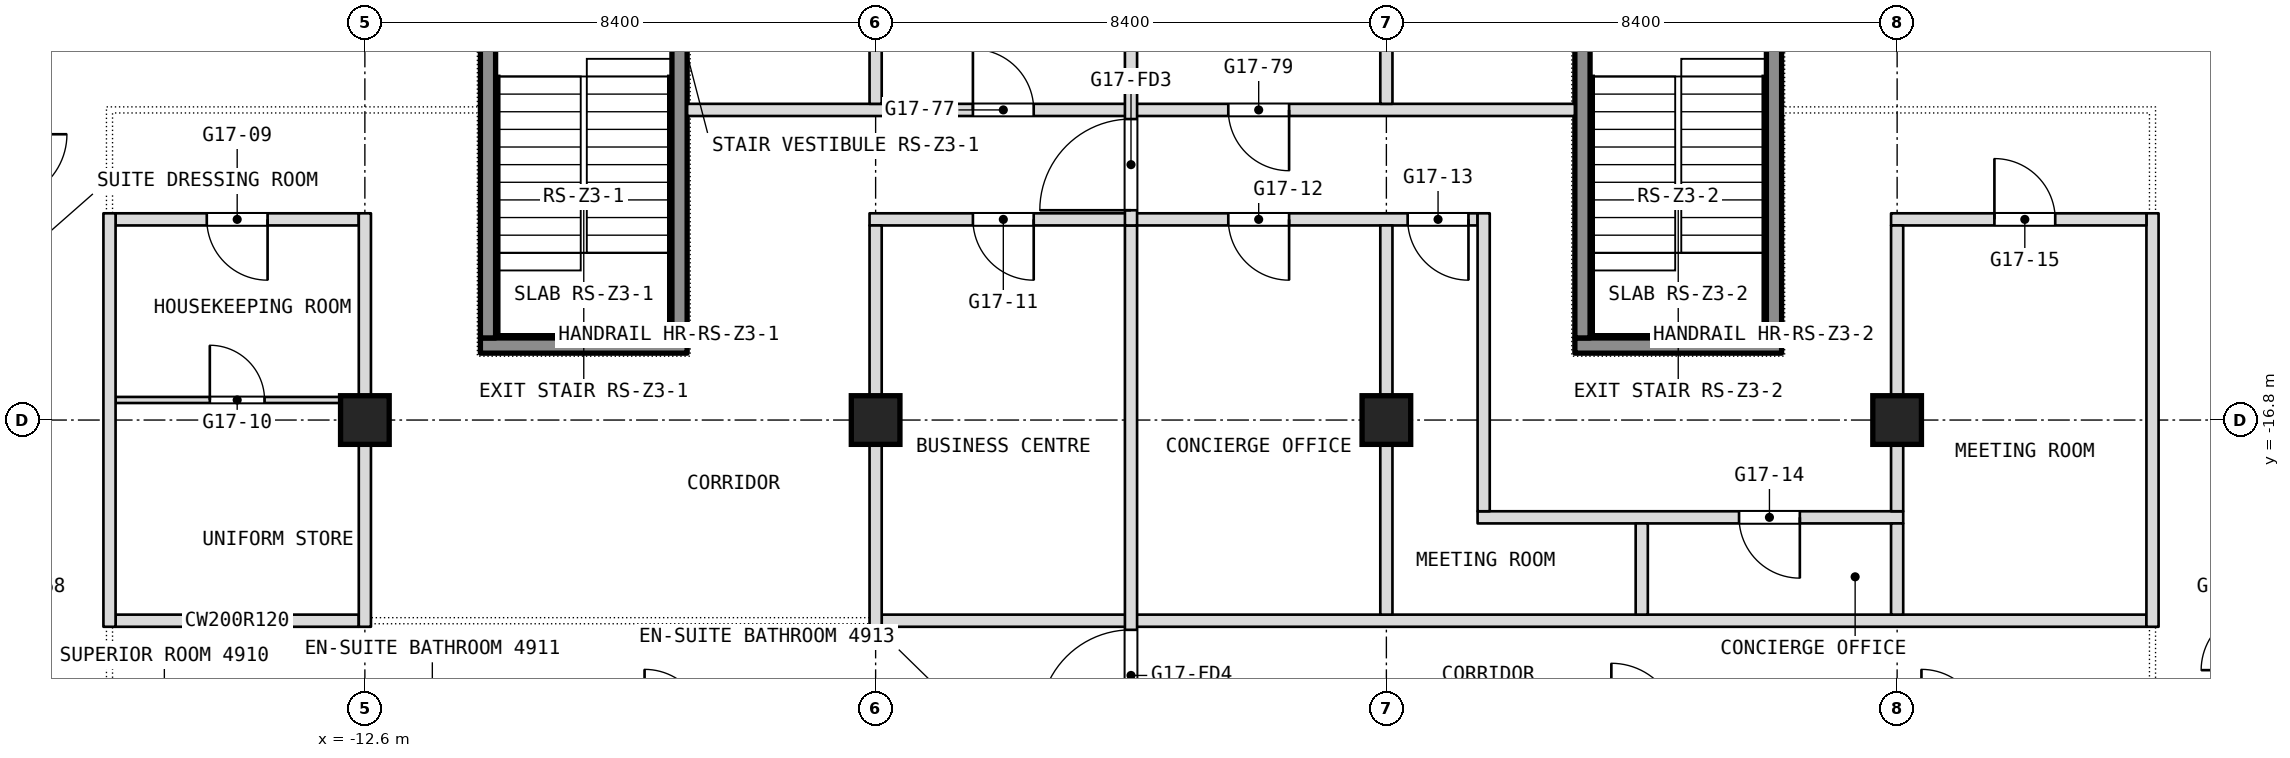
"""IFC4 building model, lengths in metres.
Left out: names, types, materials, properties, quantities, classifications, styles, units other than length and angle.
Written with IfcOpenShell. Run it as: python <this file> out.ifc"""

import sys

from ifc_helpers import new_model, si_unit, direction, frame, frame_2d, origin, origin_2d, place, context, subcontext, project, spatial, rectangle, extrude, element, fill, save


model = new_model("IFC4")
c1 = context("Model", 3, precision=1e-05, world=origin(), true_north=direction((0.0, 1.0)))
c2 = subcontext(c1, "Body", "Model", "MODEL_VIEW")
j1 = project(units=[si_unit("LENGTHUNIT", "METRE"), si_unit("PLANEANGLEUNIT", "RADIAN")], contexts=[c1])
p1 = place(None, origin())
s1 = spatial("IfcSite", under=j1, at=p1, CompositionType="ELEMENT")
p2 = place(p1, origin())
s2 = spatial("IfcBuilding", under=s1, at=p2, CompositionType="ELEMENT")
p3 = place(p2, frame((0.0, 0.0, 212.9)))
s3 = spatial("IfcBuildingStorey", under=s2, at=p3, CompositionType="ELEMENT", Elevation=212.9)
for number, where, z_axis, x_axis in (
    (1, (-12.6, -16.8, 0.0), (0.0, 0.0, 1.0), (1.0, 0.0, 0.0)),
    (2, (-4.2, -16.8, 0.0), (0.0, 0.0, 1.0), (1.0, 0.0, 0.0)),
    (3, (4.2, -16.8, 0.0), (0.0, 0.0, 1.0), (1.0, 0.0, 0.0)),
    (4, (12.6, -16.8, 0.0), (0.0, 0.0, 1.0), (1.0, 0.0, 0.0)),
):
    element("IfcColumn", number, at=place(p3, frame(where, z_axis=z_axis, x_axis=x_axis)), inside=s3, PredefinedType="COLUMN", context=c2, shape_type="SweptSolid", body=[
        extrude(rectangle(XDim=0.8, YDim=0.8, at=origin_2d()), origin(), (0.0, 0.0, 1.0), 3.6),
    ])
p4 = place(p3, frame((-16.7, -20.1, 0.0), z_axis=(0.0, 0.0, 1.0), x_axis=(1.0, 0.0, 0.0)))
e5 = element("IfcWall", 5, at=p4, inside=s3, PredefinedType="PARTITIONING", context=c2, shape_type="SweptSolid", body=[
    extrude(rectangle(XDim=4.0, YDim=0.2, at=frame_2d((2.0, 0.0))), origin(), (0.0, 0.0, 1.0), 3.34),
])
p5 = place(p3, frame((-4.1, -20.1, 0.0), z_axis=(0.0, 0.0, 1.0), x_axis=(1.0, 0.0, 0.0)))
e6 = element("IfcWall", 6, at=p5, inside=s3, PredefinedType="PARTITIONING", context=c2, shape_type="SweptSolid", body=[
    extrude(rectangle(XDim=20.8, YDim=0.2, at=frame_2d((10.4, 0.0))), origin(), (0.0, 0.0, 1.0), 3.34),
])
p6 = place(p3, frame((5.7, -18.4, 0.0), z_axis=(0.0, 0.0, 1.0), x_axis=(1.0, 0.0, 0.0)))
e7 = element("IfcWall", 7, at=p6, inside=s3, PredefinedType="PARTITIONING", context=c2, shape_type="SweptSolid", body=[
    extrude(rectangle(XDim=7.0, YDim=0.2, at=frame_2d((3.5, 0.0))), origin(), (0.0, 0.0, 1.0), 3.34),
])
p7 = place(p6, frame((4.3, 0.0, 0.0)))
e8 = element("IfcOpeningElement", 8, at=p7, cuts=e7, PredefinedType="OPENING", context=c2, shape_type="SweptSolid", body=[
    extrude(rectangle(XDim=1.0, YDim=2.1, at=frame_2d((0.5, 1.05))), frame((0.0, 0.1, 0.0), z_axis=(0.0, -1.0, 0.0), x_axis=(1.0, 0.0, 0.0)), (0.0, 0.0, 1.0), 0.2),
])
p8 = place(p3, frame((16.8, -20.2, 0.0), z_axis=(0.0, 0.0, 1.0), x_axis=(0.0, 1.0, 0.0)))
e9 = element("IfcWall", 9, at=p8, inside=s3, PredefinedType="PARTITIONING", context=c2, shape_type="SweptSolid", body=[
    extrude(rectangle(XDim=6.8, YDim=0.2, at=frame_2d((3.4, 0.0))), origin(), (0.0, 0.0, 1.0), 3.34),
])
p9 = place(p3, frame((-16.7, -16.47, 0.0), z_axis=(0.0, 0.0, 1.0), x_axis=(1.0, 0.0, 0.0)))
e10 = element("IfcWall", 10, at=p9, inside=s3, PredefinedType="PARTITIONING", context=c2, shape_type="SweptSolid", body=[
    extrude(rectangle(XDim=4.0, YDim=0.1, at=frame_2d((2.0, 0.0))), origin(), (0.0, 0.0, 1.0), 3.34),
])
p10 = place(p9, frame((1.55, 0.0, 0.0)))
e11 = element("IfcOpeningElement", 11, at=p10, cuts=e10, PredefinedType="OPENING", context=c2, shape_type="SweptSolid", body=[
    extrude(rectangle(XDim=0.9, YDim=2.1, at=frame_2d((0.45, 1.05))), frame((0.0, 0.05, 0.0), z_axis=(0.0, -1.0, 0.0), x_axis=(1.0, 0.0, 0.0)), (0.0, 0.0, 1.0), 0.1),
])
p11 = place(p3, frame((-16.7, -13.5, 0.0), z_axis=(0.0, 0.0, 1.0), x_axis=(1.0, 0.0, 0.0)))
e12 = element("IfcWall", 12, at=p11, inside=s3, PredefinedType="PARTITIONING", context=c2, shape_type="SweptSolid", body=[
    extrude(rectangle(XDim=4.0, YDim=0.2, at=frame_2d((2.0, 0.0))), origin(), (0.0, 0.0, 1.0), 3.34),
])
p12 = place(p11, frame((1.5, 0.0, 0.0)))
e13 = element("IfcOpeningElement", 13, at=p12, cuts=e12, PredefinedType="OPENING", context=c2, shape_type="SweptSolid", body=[
    extrude(rectangle(XDim=1.0, YDim=2.1, at=frame_2d((0.5, 1.05))), frame((0.0, 0.1, 0.0), z_axis=(0.0, -1.0, 0.0), x_axis=(1.0, 0.0, 0.0)), (0.0, 0.0, 1.0), 0.2),
])
p13 = place(p3, frame((-4.3, -13.5, 0.0), z_axis=(0.0, 0.0, 1.0), x_axis=(1.0, 0.0, 0.0)))
e14 = element("IfcWall", 14, at=p13, inside=s3, PredefinedType="PARTITIONING", context=c2, shape_type="SweptSolid", body=[
    extrude(rectangle(XDim=10.0, YDim=0.2, at=frame_2d((5.0, 0.0))), origin(), (0.0, 0.0, 1.0), 3.34),
])
p14 = place(p13, frame((1.7, 0.0, 0.0)))
e15 = element("IfcOpeningElement", 15, at=p14, cuts=e14, PredefinedType="OPENING", context=c2, shape_type="SweptSolid", body=[
    extrude(rectangle(XDim=1.0, YDim=2.1, at=frame_2d((0.5, 1.05))), frame((0.0, 0.1, 0.0), z_axis=(0.0, -1.0, 0.0), x_axis=(1.0, 0.0, 0.0)), (0.0, 0.0, 1.0), 0.2),
])
p15 = place(p13, frame((5.9, 0.0, 0.0)))
e16 = element("IfcOpeningElement", 16, at=p15, cuts=e14, PredefinedType="OPENING", context=c2, shape_type="SweptSolid", body=[
    extrude(rectangle(XDim=1.0, YDim=2.1, at=frame_2d((0.5, 1.05))), frame((0.0, 0.1, 0.0), z_axis=(0.0, -1.0, 0.0), x_axis=(1.0, 0.0, 0.0)), (0.0, 0.0, 1.0), 0.2),
])
p16 = place(p13, frame((8.85, 0.0, 0.0)))
e17 = element("IfcOpeningElement", 17, at=p16, cuts=e14, PredefinedType="OPENING", context=c2, shape_type="SweptSolid", body=[
    extrude(rectangle(XDim=1.0, YDim=2.1, at=frame_2d((0.5, 1.05))), frame((0.0, 0.1, 0.0), z_axis=(0.0, -1.0, 0.0), x_axis=(1.0, 0.0, 0.0)), (0.0, 0.0, 1.0), 0.2),
])
p17 = place(p3, frame((12.5, -13.5, 0.0), z_axis=(0.0, 0.0, 1.0), x_axis=(1.0, 0.0, 0.0)))
e18 = element("IfcWall", 18, at=p17, inside=s3, PredefinedType="PARTITIONING", context=c2, shape_type="SweptSolid", body=[
    extrude(rectangle(XDim=4.2, YDim=0.2, at=frame_2d((2.1, 0.0))), origin(), (0.0, 0.0, 1.0), 3.34),
])
p18 = place(p17, frame((1.7, 0.0, 0.0)))
e19 = element("IfcOpeningElement", 19, at=p18, cuts=e18, PredefinedType="OPENING", context=c2, shape_type="SweptSolid", body=[
    extrude(rectangle(XDim=1.0, YDim=2.1, at=frame_2d((0.5, 1.05))), frame((0.0, 0.1, 0.0), z_axis=(0.0, -1.0, 0.0), x_axis=(1.0, 0.0, 0.0)), (0.0, 0.0, 1.0), 0.2),
])
p19 = place(p3, frame((12.6, -20.0, 0.0), z_axis=(0.0, 0.0, 1.0), x_axis=(0.0, 1.0, 0.0)))
e20 = element("IfcWall", 20, at=p19, inside=s3, PredefinedType="PARTITIONING", context=c2, shape_type="SweptSolid", body=[
    extrude(rectangle(XDim=1.5, YDim=0.2, at=frame_2d((0.75, 0.0))), origin(), (0.0, 0.0, 1.0), 3.34),
])
p20 = place(p3, frame((12.6, -18.3, 0.0), z_axis=(0.0, 0.0, 1.0), x_axis=(0.0, 1.0, 0.0)))
e21 = element("IfcWall", 21, at=p20, inside=s3, PredefinedType="PARTITIONING", context=c2, shape_type="SweptSolid", body=[
    extrude(rectangle(XDim=4.7, YDim=0.2, at=frame_2d((2.35, 0.0))), origin(), (0.0, 0.0, 1.0), 3.34),
])
p21 = place(p3, frame((-7.3, -11.7, 0.0), z_axis=(0.0, 0.0, 1.0), x_axis=(1.0, 0.0, 0.0)))
e22 = element("IfcWall", 22, at=p21, inside=s3, PredefinedType="PARTITIONING", context=c2, shape_type="SweptSolid", body=[
    extrude(rectangle(XDim=14.6, YDim=0.2, at=frame_2d((7.3, 0.0))), origin(), (0.0, 0.0, 1.0), 3.34),
])
p22 = place(p21, frame((4.7, 0.0, 0.0)))
e23 = element("IfcOpeningElement", 23, at=p22, cuts=e22, PredefinedType="OPENING", context=c2, shape_type="SweptSolid", body=[
    extrude(rectangle(XDim=1.0, YDim=2.1, at=frame_2d((0.5, 1.05))), frame((0.0, 0.1, 0.0), z_axis=(0.0, -1.0, 0.0), x_axis=(1.0, 0.0, 0.0)), (0.0, 0.0, 1.0), 0.2),
])
p23 = place(p21, frame((8.9, 0.0, 0.0)))
e24 = element("IfcOpeningElement", 24, at=p23, cuts=e22, PredefinedType="OPENING", context=c2, shape_type="SweptSolid", body=[
    extrude(rectangle(XDim=1.0, YDim=2.1, at=frame_2d((0.5, 1.05))), frame((0.0, 0.1, 0.0), z_axis=(0.0, -1.0, 0.0), x_axis=(1.0, 0.0, 0.0)), (0.0, 0.0, 1.0), 0.2),
])
p24 = place(p3, frame((8.4, -20.0, 0.0), z_axis=(0.0, 0.0, 1.0), x_axis=(0.0, 1.0, 0.0)))
e25 = element("IfcWall", 25, at=p24, inside=s3, PredefinedType="PARTITIONING", context=c2, shape_type="SweptSolid", body=[
    extrude(rectangle(XDim=1.5, YDim=0.2, at=frame_2d((0.75, 0.0))), origin(), (0.0, 0.0, 1.0), 3.34),
])
p25 = place(p3, frame((5.8, -18.3, 0.0), z_axis=(0.0, 0.0, 1.0), x_axis=(0.0, 1.0, 0.0)))
e26 = element("IfcWall", 26, at=p25, inside=s3, PredefinedType="PARTITIONING", context=c2, shape_type="SweptSolid", body=[
    extrude(rectangle(XDim=4.9, YDim=0.2, at=frame_2d((2.45, 0.0))), origin(), (0.0, 0.0, 1.0), 3.34),
])
p26 = place(p3, frame((4.2, -20.0, 0.0), z_axis=(0.0, 0.0, 1.0), x_axis=(0.0, 1.0, 0.0)))
e27 = element("IfcWall", 27, at=p26, inside=s3, PredefinedType="PARTITIONING", context=c2, shape_type="SweptSolid", body=[
    extrude(rectangle(XDim=6.4, YDim=0.2, at=frame_2d((3.2, 0.0))), origin(), (0.0, 0.0, 1.0), 3.34),
])
p27 = place(p3, frame((4.2, -11.6, 0.0), z_axis=(0.0, 0.0, 1.0), x_axis=(0.0, 1.0, 0.0)))
e28 = element("IfcWall", 28, at=p27, inside=s3, PredefinedType="PARTITIONING", context=c2, shape_type="SweptSolid", body=[
    extrude(rectangle(XDim=9.7, YDim=0.2, at=frame_2d((4.85, 0.0))), origin(), (0.0, 0.0, 1.0), 3.34),
])
p28 = place(p3, frame((0.0, -22.0, 0.0), z_axis=(0.0, 0.0, 1.0), x_axis=(0.0, 1.0, 0.0)))
e29 = element("IfcWall", 29, at=p28, inside=s3, PredefinedType="PARTITIONING", context=c2, shape_type="SweptSolid", body=[
    extrude(rectangle(XDim=8.4, YDim=0.2, at=frame_2d((4.2, 0.0))), origin(), (0.0, 0.0, 1.0), 3.34),
])
p29 = place(p28, frame((0.25, 0.0, 0.0)))
e30 = element("IfcOpeningElement", 30, at=p29, cuts=e29, PredefinedType="OPENING", context=c2, shape_type="SweptSolid", body=[
    extrude(rectangle(XDim=1.5, YDim=2.1, at=frame_2d((0.75, 1.05))), frame((0.0, 0.1, 0.0), z_axis=(0.0, -1.0, 0.0), x_axis=(1.0, 0.0, 0.0)), (0.0, 0.0, 1.0), 0.2),
])
p30 = place(p3, frame((0.0, -13.6, 0.0), z_axis=(0.0, 0.0, 1.0), x_axis=(0.0, 1.0, 0.0)))
e31 = element("IfcWall", 31, at=p30, inside=s3, PredefinedType="PARTITIONING", context=c2, shape_type="SweptSolid", body=[
    extrude(rectangle(XDim=13.6, YDim=0.2, at=frame_2d((6.8, 0.0))), origin(), (0.0, 0.0, 1.0), 3.34),
])
p31 = place(p30, frame((11.95, 0.0, 0.0)))
e32 = element("IfcOpeningElement", 32, at=p31, cuts=e31, PredefinedType="OPENING", context=c2, shape_type="SweptSolid", body=[
    extrude(rectangle(XDim=1.5, YDim=2.1, at=frame_2d((0.75, 1.05))), frame((0.0, 0.1, 0.0), z_axis=(0.0, -1.0, 0.0), x_axis=(1.0, 0.0, 0.0)), (0.0, 0.0, 1.0), 0.2),
])
p32 = place(p30, frame((0.25, 0.0, 0.0)))
e33 = element("IfcOpeningElement", 33, at=p32, cuts=e31, PredefinedType="OPENING", context=c2, shape_type="SweptSolid", body=[
    extrude(rectangle(XDim=1.5, YDim=2.1, at=frame_2d((0.75, 1.05))), frame((0.0, 0.1, 0.0), z_axis=(0.0, -1.0, 0.0), x_axis=(1.0, 0.0, 0.0)), (0.0, 0.0, 1.0), 0.2),
])
p33 = place(p3, frame((-4.2, -11.6, 0.0), z_axis=(0.0, 0.0, 1.0), x_axis=(0.0, 1.0, 0.0)))
e34 = element("IfcWall", 34, at=p33, inside=s3, PredefinedType="PARTITIONING", context=c2, shape_type="SweptSolid", body=[
    extrude(rectangle(XDim=9.7, YDim=0.2, at=frame_2d((4.85, 0.0))), origin(), (0.0, 0.0, 1.0), 3.34),
])
p34 = place(p3, frame((-4.2, -20.2, 0.0), z_axis=(0.0, 0.0, 1.0), x_axis=(0.0, 1.0, 0.0)))
e35 = element("IfcWall", 35, at=p34, inside=s3, PredefinedType="PARTITIONING", context=c2, shape_type="SweptSolid", body=[
    extrude(rectangle(XDim=6.6, YDim=0.2, at=frame_2d((3.3, 0.0))), origin(), (0.0, 0.0, 1.0), 3.34),
])
for number, where, z_axis, x_axis in (
    (36, (-12.6, -20.2, 0.0), (0.0, 0.0, 1.0), (0.0, 1.0, 0.0)),
    (37, (-16.8, -20.2, 0.0), (0.0, 0.0, 1.0), (0.0, 1.0, 0.0)),
):
    element("IfcWall", number, at=place(p3, frame(where, z_axis=z_axis, x_axis=x_axis)), inside=s3, PredefinedType="PARTITIONING", context=c2, shape_type="SweptSolid", body=[
        extrude(rectangle(XDim=6.8, YDim=0.2, at=frame_2d((3.4, 0.0))), origin(), (0.0, 0.0, 1.0), 3.34),
    ])
p35 = place(p3, frame((-10.7, -15.575, 0.1), z_axis=(0.0, 0.0, 1.0), x_axis=(1.0, 0.0, 0.0)))
e38 = element("IfcWall", 38, at=p35, inside=s3, PredefinedType="SHEAR", context=c2, shape_type="SweptSolid", body=[
    extrude(rectangle(XDim=3.4, YDim=0.25, at=frame_2d((1.7, 0.0))), origin(), (0.0, 0.0, 1.0), 3.6),
])
for number, where, z_axis, x_axis in (
    (39, (-10.575, -15.45, 0.1), (0.0, 0.0, 1.0), (0.0, 1.0, 0.0)),
    (40, (-7.425, -15.45, 0.1), (0.0, 0.0, 1.0), (0.0, 1.0, 0.0)),
):
    element("IfcWall", number, at=place(p3, frame(where, z_axis=z_axis, x_axis=x_axis)), inside=s3, PredefinedType="SHEAR", context=c2, shape_type="SweptSolid", body=[
        extrude(rectangle(XDim=5.7, YDim=0.25, at=frame_2d((2.85, 0.0))), origin(), (0.0, 0.0, 1.0), 3.6),
    ])
p36 = place(p3, frame((7.3, -15.575, 0.1), z_axis=(0.0, 0.0, 1.0), x_axis=(1.0, 0.0, 0.0)))
e41 = element("IfcWall", 41, at=p36, inside=s3, PredefinedType="SHEAR", context=c2, shape_type="SweptSolid", body=[
    extrude(rectangle(XDim=3.4, YDim=0.25, at=frame_2d((1.7, 0.0))), origin(), (0.0, 0.0, 1.0), 3.6),
])
for number, where, z_axis, x_axis in (
    (42, (7.425, -15.45, 0.1), (0.0, 0.0, 1.0), (0.0, 1.0, 0.0)),
    (43, (10.575, -15.45, 0.1), (0.0, 0.0, 1.0), (0.0, 1.0, 0.0)),
):
    element("IfcWall", number, at=place(p3, frame(where, z_axis=z_axis, x_axis=x_axis)), inside=s3, PredefinedType="SHEAR", context=c2, shape_type="SweptSolid", body=[
        extrude(rectangle(XDim=5.7, YDim=0.25, at=frame_2d((2.85, 0.0))), origin(), (0.0, 0.0, 1.0), 3.6),
    ])
p37 = place(p7, origin())
e44 = element("IfcDoor", 44, at=p37, inside=s3, OperationType="SINGLE_SWING_LEFT", PredefinedType="DOOR", context=c2, shape_type="SweptSolid", body=[
    extrude(rectangle(XDim=1.0, YDim=2.1, at=frame_2d((0.5, 1.05))), frame((0.0, 0.025, 0.0), z_axis=(0.0, -1.0, 0.0), x_axis=(1.0, 0.0, 0.0)), (0.0, 0.0, 1.0), 0.05),
])
fill(e8, e44)
p38 = place(p10, origin())
e45 = element("IfcDoor", 45, at=p38, inside=s3, OperationType="SINGLE_SWING_LEFT", PredefinedType="DOOR", context=c2, shape_type="SweptSolid", body=[
    extrude(rectangle(XDim=0.9, YDim=2.1, at=frame_2d((0.45, 1.05))), frame((0.0, 0.025, 0.0), z_axis=(0.0, -1.0, 0.0), x_axis=(1.0, 0.0, 0.0)), (0.0, 0.0, 1.0), 0.05),
])
fill(e11, e45)
p39 = place(p12, origin())
e46 = element("IfcDoor", 46, at=p39, inside=s3, OperationType="SINGLE_SWING_LEFT", PredefinedType="DOOR", context=c2, shape_type="SweptSolid", body=[
    extrude(rectangle(XDim=1.0, YDim=2.1, at=frame_2d((0.5, 1.05))), frame((0.0, 0.025, 0.0), z_axis=(0.0, -1.0, 0.0), x_axis=(1.0, 0.0, 0.0)), (0.0, 0.0, 1.0), 0.05),
])
fill(e13, e46)
p40 = place(p14, origin())
e47 = element("IfcDoor", 47, at=p40, inside=s3, OperationType="SINGLE_SWING_LEFT", PredefinedType="DOOR", context=c2, shape_type="SweptSolid", body=[
    extrude(rectangle(XDim=1.0, YDim=2.1, at=frame_2d((0.5, 1.05))), frame((0.0, 0.025, 0.0), z_axis=(0.0, -1.0, 0.0), x_axis=(1.0, 0.0, 0.0)), (0.0, 0.0, 1.0), 0.05),
])
fill(e15, e47)
p41 = place(p15, origin())
e48 = element("IfcDoor", 48, at=p41, inside=s3, OperationType="SINGLE_SWING_RIGHT", PredefinedType="DOOR", context=c2, shape_type="SweptSolid", body=[
    extrude(rectangle(XDim=1.0, YDim=2.1, at=frame_2d((0.5, 1.05))), frame((0.0, 0.025, 0.0), z_axis=(0.0, -1.0, 0.0), x_axis=(1.0, 0.0, 0.0)), (0.0, 0.0, 1.0), 0.05),
])
fill(e16, e48)
p42 = place(p16, origin())
e49 = element("IfcDoor", 49, at=p42, inside=s3, OperationType="SINGLE_SWING_LEFT", PredefinedType="DOOR", context=c2, shape_type="SweptSolid", body=[
    extrude(rectangle(XDim=1.0, YDim=2.1, at=frame_2d((0.5, 1.05))), frame((0.0, 0.025, 0.0), z_axis=(0.0, -1.0, 0.0), x_axis=(1.0, 0.0, 0.0)), (0.0, 0.0, 1.0), 0.05),
])
fill(e17, e49)
p43 = place(p18, origin())
e50 = element("IfcDoor", 50, at=p43, inside=s3, OperationType="SINGLE_SWING_LEFT", PredefinedType="DOOR", context=c2, shape_type="SweptSolid", body=[
    extrude(rectangle(XDim=1.0, YDim=2.1, at=frame_2d((0.5, 1.05))), frame((0.0, 0.025, 0.0), z_axis=(0.0, -1.0, 0.0), x_axis=(1.0, 0.0, 0.0)), (0.0, 0.0, 1.0), 0.05),
])
fill(e19, e50)
p44 = place(p22, origin())
e51 = element("IfcDoor", 51, at=p44, inside=s3, OperationType="SINGLE_SWING_LEFT", PredefinedType="DOOR", context=c2, shape_type="SweptSolid", body=[
    extrude(rectangle(XDim=1.0, YDim=2.1, at=frame_2d((0.5, 1.05))), frame((0.0, 0.025, 0.0), z_axis=(0.0, -1.0, 0.0), x_axis=(1.0, 0.0, 0.0)), (0.0, 0.0, 1.0), 0.05),
])
fill(e23, e51)
p45 = place(p23, origin())
e52 = element("IfcDoor", 52, at=p45, inside=s3, OperationType="SINGLE_SWING_LEFT", PredefinedType="DOOR", context=c2, shape_type="SweptSolid", body=[
    extrude(rectangle(XDim=1.0, YDim=2.1, at=frame_2d((0.5, 1.05))), frame((0.0, 0.025, 0.0), z_axis=(0.0, -1.0, 0.0), x_axis=(1.0, 0.0, 0.0)), (0.0, 0.0, 1.0), 0.05),
])
fill(e24, e52)
p46 = place(p32, origin())
e53 = element("IfcDoor", 53, at=p46, inside=s3, OperationType="DOUBLE_DOOR_DOUBLE_SWING", PredefinedType="DOOR", context=c2, shape_type="SweptSolid", body=[
    extrude(rectangle(XDim=1.5, YDim=2.1, at=frame_2d((0.75, 1.05))), frame((0.0, 0.025, 0.0), z_axis=(0.0, -1.0, 0.0), x_axis=(1.0, 0.0, 0.0)), (0.0, 0.0, 1.0), 0.05),
])
fill(e33, e53)
p47 = place(p29, origin())
e54 = element("IfcDoor", 54, at=p47, inside=s3, OperationType="DOUBLE_DOOR_DOUBLE_SWING", PredefinedType="DOOR", context=c2, shape_type="SweptSolid", body=[
    extrude(rectangle(XDim=1.5, YDim=2.1, at=frame_2d((0.75, 1.05))), frame((0.0, 0.025, 0.0), z_axis=(0.0, -1.0, 0.0), x_axis=(1.0, 0.0, 0.0)), (0.0, 0.0, 1.0), 0.05),
])
fill(e30, e54)
save(model, sys.argv[1])
